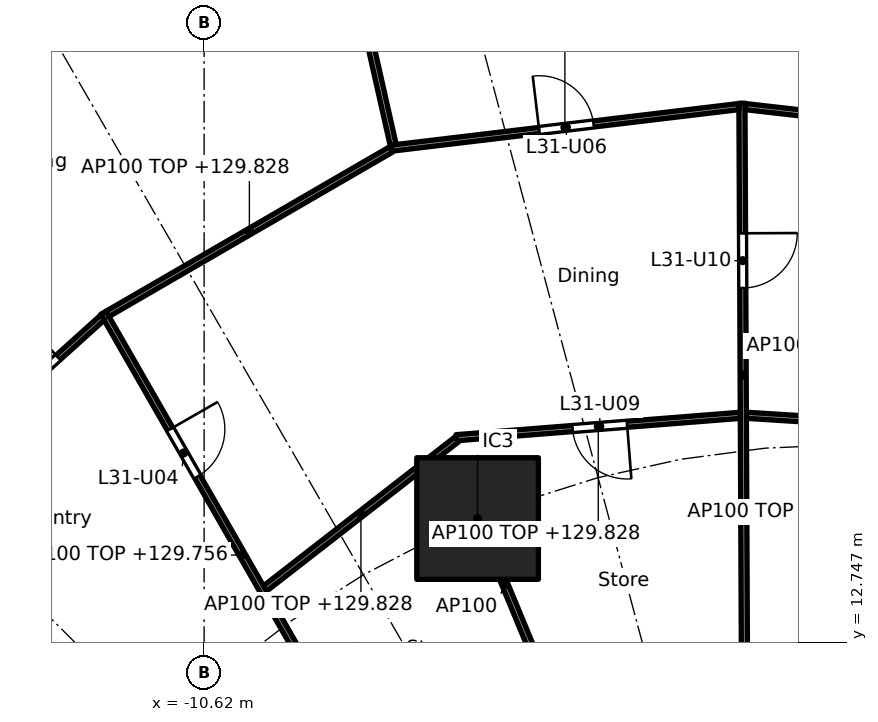
"""IFC4 building model, lengths in metres.
Left out: names, types, materials, properties, quantities, classifications, styles, units other than length and angle.
Written with IfcOpenShell. Run it as: python <this file> out.ifc"""

import sys

from ifc_helpers import new_model, si_unit, direction, frame, frame_2d, origin, origin_2d, place, context, subcontext, project, spatial, rectangle, extrude, element, fill, save


model = new_model("IFC4")
c1 = context("Model", 3, precision=1e-05, world=origin(), true_north=direction((0.0, 1.0)))
c2 = subcontext(c1, "Body", "Model", "MODEL_VIEW")
j1 = project(units=[si_unit("LENGTHUNIT", "METRE"), si_unit("PLANEANGLEUNIT", "RADIAN")], contexts=[c1])
p1 = place(None, origin())
s1 = spatial("IfcSite", under=j1, at=p1, CompositionType="ELEMENT")
p2 = place(p1, origin())
s2 = spatial("IfcBuilding", under=s1, at=p2, CompositionType="ELEMENT")
p3 = place(p2, frame((0.0, 0.0, 127.0)))
s3 = spatial("IfcBuildingStorey", under=s2, at=p3, CompositionType="ELEMENT", Elevation=127.0)
p4 = place(p3, frame((-6.123, 14.782, 0.0), z_axis=(0.0, 0.0, 1.0), x_axis=(1.0, 0.0, 0.0)))
e1 = element("IfcColumn", 1, at=p4, inside=s3, PredefinedType="COLUMN", context=c2, shape_type="SweptSolid", body=[
    extrude(rectangle(XDim=2.0, YDim=2.0, at=origin_2d()), origin(), (0.0, 0.0, 1.0), 3.7),
])
p5 = place(p3, frame((2.685, 16.202, 0.0), z_axis=(0.0, 0.0, 1.0), x_axis=(-0.998000808042, 0.063201164138, 0.0)))
e2 = element("IfcWall", 2, at=p5, inside=s3, PredefinedType="PARTITIONING", context=c2, shape_type="SweptSolid", body=[
    extrude(rectangle(XDim=4.396, YDim=0.1, at=frame_2d((2.198, 0.0))), origin(), (0.0, 0.0, 1.0), 2.828),
])
p6 = place(p5, frame((1.773, 0.0, 0.0)))
e3 = element("IfcOpeningElement", 3, at=p6, cuts=e2, PredefinedType="OPENING", context=c2, shape_type="SweptSolid", body=[
    extrude(rectangle(XDim=0.9, YDim=2.1, at=frame_2d((0.45, 1.05))), frame((0.0, 0.06, 0.0), z_axis=(0.0, -1.0, 0.0), x_axis=(1.0, 0.0, 0.0)), (0.0, 0.0, 1.0), 0.12),
])
p7 = place(p3, frame((3.851, 20.919, 0.0), z_axis=(0.0, 0.0, 1.0), x_axis=(-0.993519908136, 0.11365822512, 0.0)))
e4 = element("IfcWall", 4, at=p7, inside=s3, PredefinedType="PARTITIONING", context=c2, shape_type="SweptSolid", body=[
    extrude(rectangle(XDim=5.613, YDim=0.1, at=frame_2d((2.806, 0.0))), origin(), (0.0, 0.0, 1.0), 2.828),
])
p8 = place(p3, frame((-1.735, 12.665, 0.0), z_axis=(0.0, 0.0, 1.0), x_axis=(-0.004474716456, 0.999989988406, 0.0)))
e5 = element("IfcWall", 5, at=p8, inside=s3, PredefinedType="PARTITIONING", context=c2, shape_type="SweptSolid", body=[
    extrude(rectangle(XDim=8.948, YDim=0.1, at=frame_2d((4.474, 0.0))), origin(), (0.0, 0.0, 1.0), 2.756),
])
p9 = place(p8, frame((5.908, 0.0, 0.0)))
e6 = element("IfcOpeningElement", 6, at=p9, cuts=e5, PredefinedType="OPENING", context=c2, shape_type="SweptSolid", body=[
    extrude(rectangle(XDim=0.9, YDim=2.1, at=frame_2d((0.45, 1.05))), frame((0.0, 0.06, 0.0), z_axis=(0.0, -1.0, 0.0), x_axis=(1.0, 0.0, 0.0)), (0.0, 0.0, 1.0), 0.12),
])
p10 = place(p3, frame((-1.802, 16.479, 0.0), z_axis=(0.0, 0.0, 1.0), x_axis=(-0.996909003513, -0.078564869469, 0.0)))
e7 = element("IfcWall", 7, at=p10, inside=s3, PredefinedType="PARTITIONING", context=c2, shape_type="SweptSolid", body=[
    extrude(rectangle(XDim=4.686, YDim=0.1, at=frame_2d((2.343, 0.0))), origin(), (0.0, 0.0, 1.0), 2.828),
])
p11 = place(p10, frame((1.868, 0.0, 0.0)))
e8 = element("IfcOpeningElement", 8, at=p11, cuts=e7, PredefinedType="OPENING", context=c2, shape_type="SweptSolid", body=[
    extrude(rectangle(XDim=0.9, YDim=2.1, at=frame_2d((0.45, 1.05))), frame((0.0, 0.06, 0.0), z_axis=(0.0, -1.0, 0.0), x_axis=(1.0, 0.0, 0.0)), (0.0, 0.0, 1.0), 0.12),
])
p12 = place(p3, frame((-1.825, 21.557, 0.0), z_axis=(0.0, 0.0, 1.0), x_axis=(-0.992915657947, -0.118821278412, 0.0)))
e9 = element("IfcWall", 9, at=p12, inside=s3, PredefinedType="PARTITIONING", context=c2, shape_type="SweptSolid", body=[
    extrude(rectangle(XDim=5.765, YDim=0.1, at=frame_2d((2.883, 0.0))), origin(), (0.0, 0.0, 1.0), 2.828),
])
p13 = place(p12, frame((2.408, 0.0, 0.0)))
e10 = element("IfcOpeningElement", 10, at=p13, cuts=e9, PredefinedType="OPENING", context=c2, shape_type="SweptSolid", body=[
    extrude(rectangle(XDim=0.9, YDim=2.1, at=frame_2d((0.45, 1.05))), frame((0.0, 0.06, 0.0), z_axis=(0.0, -1.0, 0.0), x_axis=(1.0, 0.0, 0.0)), (0.0, 0.0, 1.0), 0.12),
])
p14 = place(p3, frame((-5.243, 12.657, 0.0), z_axis=(0.0, 0.0, 1.0), x_axis=(-0.382719158442, 0.923864733477, 0.0)))
e11 = element("IfcWall", 11, at=p14, inside=s3, PredefinedType="PARTITIONING", context=c2, shape_type="SweptSolid", body=[
    extrude(rectangle(XDim=2.25, YDim=0.1, at=frame_2d((1.125, 0.0))), origin(), (0.0, 0.0, 1.0), 3.44),
])
p15 = place(p3, frame((-6.463, 16.084, 0.0), z_axis=(0.0, 0.0, 1.0), x_axis=(-0.789457442969, -0.613805299538, 0.0)))
e12 = element("IfcWall", 12, at=p15, inside=s3, PredefinedType="PARTITIONING", context=c2, shape_type="SweptSolid", body=[
    extrude(rectangle(XDim=3.997, YDim=0.1, at=frame_2d((1.999, 0.0))), origin(), (0.0, 0.0, 1.0), 2.828),
])
p16 = place(p3, frame((-7.511, 20.927, 0.0), z_axis=(0.0, 0.0, 1.0), x_axis=(-0.220337559031, 0.975423682345, 0.0)))
e13 = element("IfcWall", 13, at=p16, inside=s3, PredefinedType="PARTITIONING", context=c2, shape_type="SweptSolid", body=[
    extrude(rectangle(XDim=4.202, YDim=0.1, at=frame_2d((2.101, 0.0))), origin(), (0.0, 0.0, 1.0), 2.828),
])
p17 = place(p3, frame((-7.543, 20.853, 0.0), z_axis=(0.0, 0.0, 1.0), x_axis=(-0.865086194899, -0.501623240485, 0.0)))
e14 = element("IfcWall", 14, at=p17, inside=s3, PredefinedType="PARTITIONING", context=c2, shape_type="SweptSolid", body=[
    extrude(rectangle(XDim=5.393, YDim=0.1, at=frame_2d((2.697, 0.0))), origin(), (0.0, 0.0, 1.0), 2.828),
])
p18 = place(p3, frame((-7.708, 10.198, 0.0), z_axis=(0.0, 0.0, 1.0), x_axis=(-0.497449462689, 0.867492957937, 0.0)))
e15 = element("IfcWall", 15, at=p18, inside=s3, PredefinedType="PARTITIONING", context=c2, shape_type="SweptSolid", body=[
    extrude(rectangle(XDim=9.185, YDim=0.1, at=frame_2d((4.592, 0.0))), origin(), (0.0, 0.0, 1.0), 2.756),
])
p19 = place(p18, frame((1.511, 0.0, 0.0)))
e16 = element("IfcOpeningElement", 16, at=p19, cuts=e15, PredefinedType="OPENING", context=c2, shape_type="SweptSolid", body=[
    extrude(rectangle(XDim=0.9, YDim=2.1, at=frame_2d((0.45, 1.05))), frame((0.0, 0.06, 0.0), z_axis=(0.0, -1.0, 0.0), x_axis=(1.0, 0.0, 0.0)), (0.0, 0.0, 1.0), 0.12),
])
p20 = place(p18, frame((6.078, 0.0, 0.0)))
e17 = element("IfcOpeningElement", 17, at=p20, cuts=e15, PredefinedType="OPENING", context=c2, shape_type="SweptSolid", body=[
    extrude(rectangle(XDim=0.9, YDim=2.1, at=frame_2d((0.45, 1.05))), frame((0.0, 0.06, 0.0), z_axis=(0.0, -1.0, 0.0), x_axis=(1.0, 0.0, 0.0)), (0.0, 0.0, 1.0), 0.12),
])
p21 = place(p3, frame((-12.289, 18.089, 0.0), z_axis=(0.0, 0.0, 1.0), x_axis=(-0.743146066164, -0.669129228435, 0.0)))
e18 = element("IfcWall", 18, at=p21, inside=s3, PredefinedType="PARTITIONING", context=c2, shape_type="SweptSolid", body=[
    extrude(rectangle(XDim=5.739, YDim=0.1, at=frame_2d((2.87, 0.0))), origin(), (0.0, 0.0, 1.0), 2.828),
])
p22 = place(p21, frame((0.985, 0.0, 0.0)))
e19 = element("IfcOpeningElement", 19, at=p22, cuts=e18, PredefinedType="OPENING", context=c2, shape_type="SweptSolid", body=[
    extrude(rectangle(XDim=0.9, YDim=2.1, at=frame_2d((0.45, 1.05))), frame((0.0, 0.06, 0.0), z_axis=(0.0, -1.0, 0.0), x_axis=(1.0, 0.0, 0.0)), (0.0, 0.0, 1.0), 0.12),
])
p23 = place(p3, frame((-10.182, 7.729, 0.0), z_axis=(0.0, 0.0, 1.0), x_axis=(-0.702927211734, 0.711261790766, 0.0)))
e20 = element("IfcWall", 20, at=p23, inside=s3, PredefinedType="PARTITIONING", context=c2, shape_type="SweptSolid", body=[
    extrude(rectangle(XDim=9.168, YDim=0.1, at=frame_2d((4.584, 0.0))), origin(), (0.0, 0.0, 1.0), 2.756),
])
p24 = place(p23, frame((1.507, 0.0, 0.0)))
e21 = element("IfcOpeningElement", 21, at=p24, cuts=e20, PredefinedType="OPENING", context=c2, shape_type="SweptSolid", body=[
    extrude(rectangle(XDim=0.9, YDim=2.1, at=frame_2d((0.45, 1.05))), frame((0.0, 0.06, 0.0), z_axis=(0.0, -1.0, 0.0), x_axis=(1.0, 0.0, 0.0)), (0.0, 0.0, 1.0), 0.12),
])
p25 = place(p23, frame((6.067, 0.0, 0.0)))
e22 = element("IfcOpeningElement", 22, at=p25, cuts=e20, PredefinedType="OPENING", context=c2, shape_type="SweptSolid", body=[
    extrude(rectangle(XDim=0.9, YDim=2.1, at=frame_2d((0.45, 1.05))), frame((0.0, 0.06, 0.0), z_axis=(0.0, -1.0, 0.0), x_axis=(1.0, 0.0, 0.0)), (0.0, 0.0, 1.0), 0.12),
])
p26 = place(p20, frame((0.9, 0.0, 0.0), x_axis=(-1.0, 0.0, 0.0)))
e23 = element("IfcDoor", 23, at=p26, inside=s3, OperationType="SINGLE_SWING_LEFT", PredefinedType="DOOR", context=c2, shape_type="SweptSolid", body=[
    extrude(rectangle(XDim=0.9, YDim=2.1, at=frame_2d((0.45, 1.05))), frame((0.0, 0.025, 0.0), z_axis=(0.0, -1.0, 0.0), x_axis=(1.0, 0.0, 0.0)), (0.0, 0.0, 1.0), 0.05),
])
fill(e17, e23)
p27 = place(p13, frame((0.9, 0.0, 0.0), x_axis=(-1.0, 0.0, 0.0)))
e24 = element("IfcDoor", 24, at=p27, inside=s3, OperationType="SINGLE_SWING_LEFT", PredefinedType="DOOR", context=c2, shape_type="SweptSolid", body=[
    extrude(rectangle(XDim=0.9, YDim=2.1, at=frame_2d((0.45, 1.05))), frame((0.0, 0.025, 0.0), z_axis=(0.0, -1.0, 0.0), x_axis=(1.0, 0.0, 0.0)), (0.0, 0.0, 1.0), 0.05),
])
fill(e10, e24)
p28 = place(p22, frame((0.9, 0.0, 0.0), x_axis=(-1.0, 0.0, 0.0)))
e25 = element("IfcDoor", 25, at=p28, inside=s3, OperationType="SINGLE_SWING_RIGHT", PredefinedType="DOOR", context=c2, shape_type="SweptSolid", body=[
    extrude(rectangle(XDim=0.9, YDim=2.1, at=frame_2d((0.45, 1.05))), frame((0.0, 0.025, 0.0), z_axis=(0.0, -1.0, 0.0), x_axis=(1.0, 0.0, 0.0)), (0.0, 0.0, 1.0), 0.05),
])
fill(e19, e25)
p29 = place(p11, origin())
e26 = element("IfcDoor", 26, at=p29, inside=s3, OperationType="SINGLE_SWING_LEFT", PredefinedType="DOOR", context=c2, shape_type="SweptSolid", body=[
    extrude(rectangle(XDim=0.9, YDim=2.1, at=frame_2d((0.45, 1.05))), frame((0.0, 0.025, 0.0), z_axis=(0.0, -1.0, 0.0), x_axis=(1.0, 0.0, 0.0)), (0.0, 0.0, 1.0), 0.05),
])
fill(e8, e26)
p30 = place(p9, frame((0.9, 0.0, 0.0), x_axis=(-1.0, 0.0, 0.0)))
e27 = element("IfcDoor", 27, at=p30, inside=s3, OperationType="SINGLE_SWING_LEFT", PredefinedType="DOOR", context=c2, shape_type="SweptSolid", body=[
    extrude(rectangle(XDim=0.9, YDim=2.1, at=frame_2d((0.45, 1.05))), frame((0.0, 0.025, 0.0), z_axis=(0.0, -1.0, 0.0), x_axis=(1.0, 0.0, 0.0)), (0.0, 0.0, 1.0), 0.05),
])
fill(e6, e27)
save(model, sys.argv[1])
